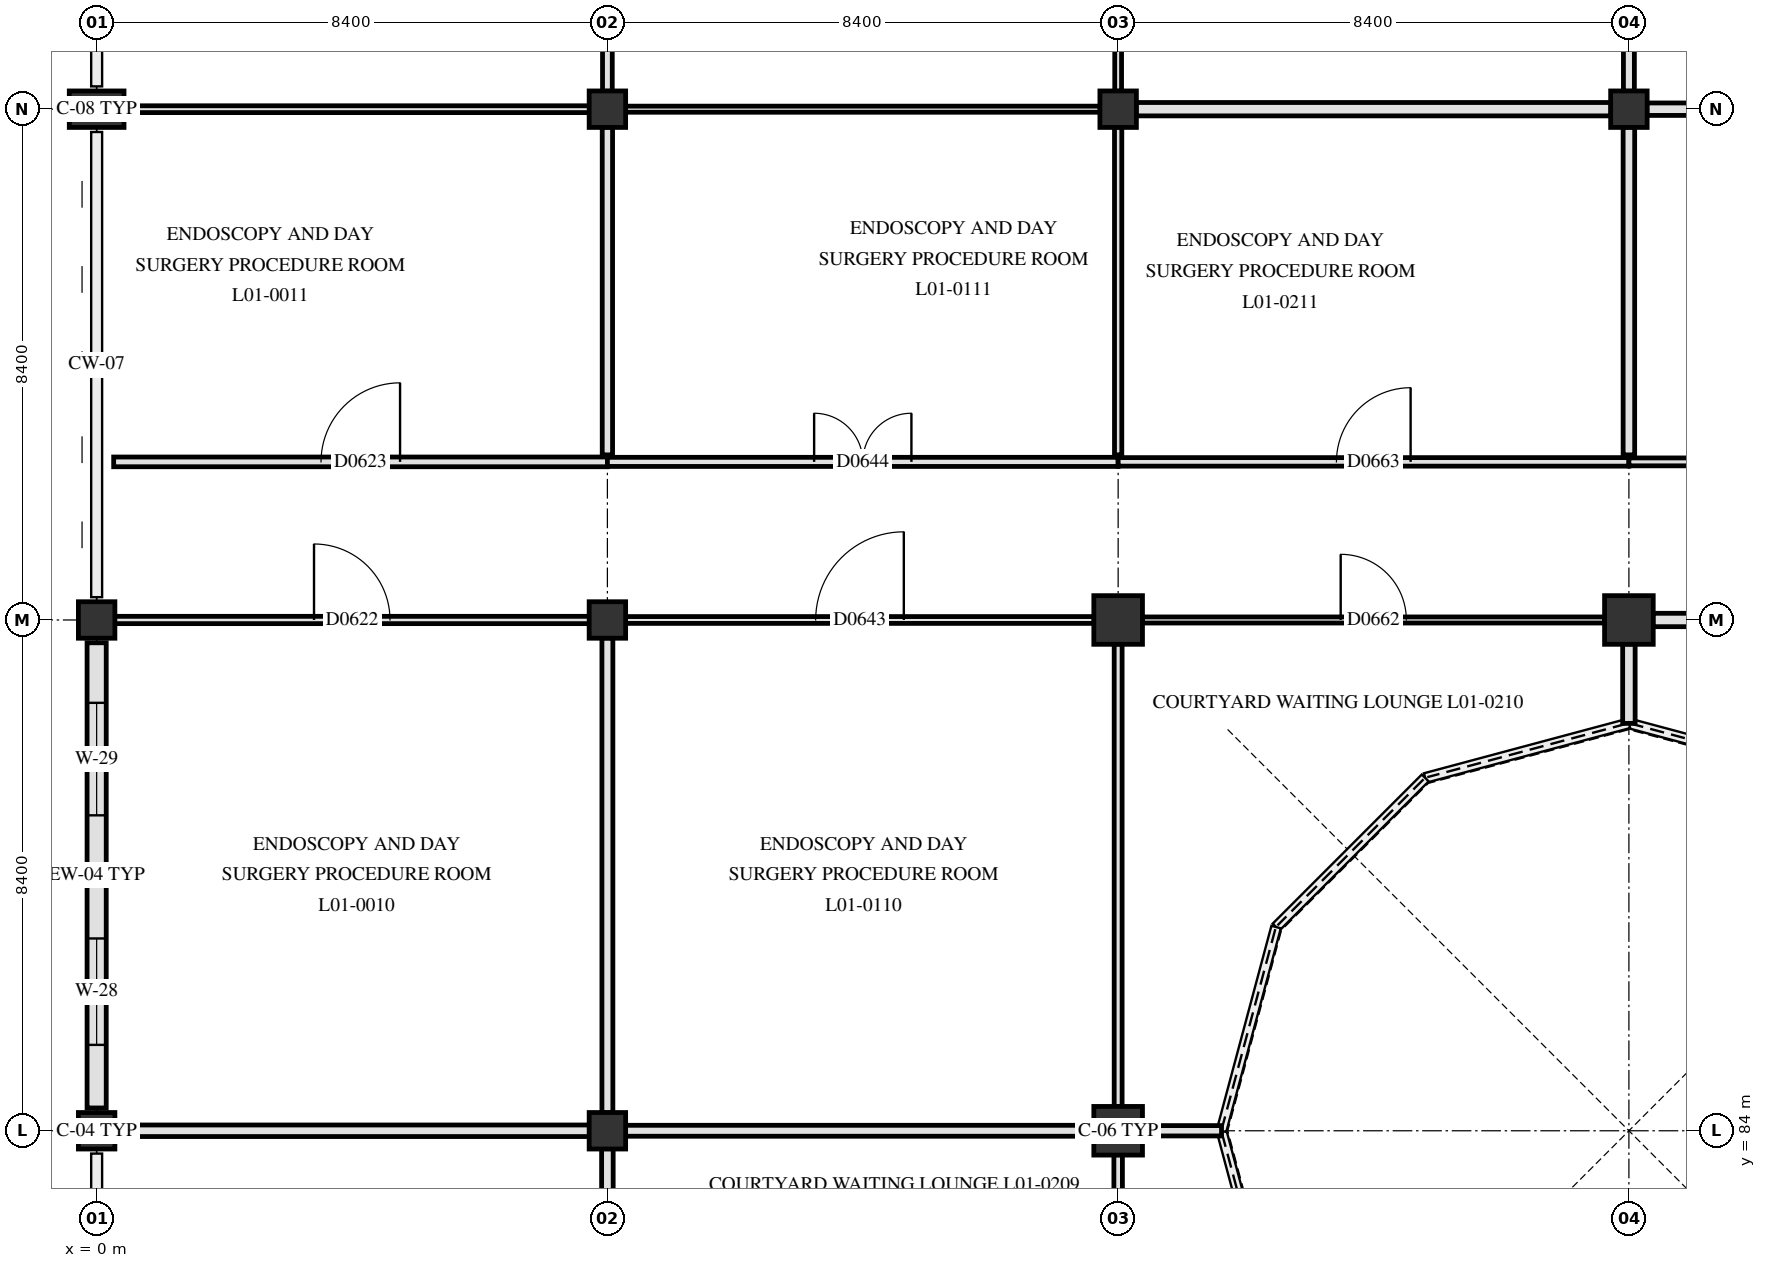
"""IFC4 building model, lengths in metres.
Left out: names, types, materials, properties, quantities, classifications, styles, units other than length and angle.
Written with IfcOpenShell. Run it as: python <this file> out.ifc"""

import sys

from ifc_helpers import new_model, si_unit, direction, frame, frame_2d, origin, origin_2d, place, context, subcontext, project, spatial, rectangle, circle, extrude, element, fill, save


model = new_model("IFC4")
c1 = context("Model", 3, precision=1e-05, world=origin(), true_north=direction((0.0, 1.0)))
c2 = subcontext(c1, "Body", "Model", "MODEL_VIEW")
j1 = project(units=[si_unit("LENGTHUNIT", "METRE"), si_unit("PLANEANGLEUNIT", "RADIAN")], contexts=[c1])
p1 = place(None, origin())
s1 = spatial("IfcSite", under=j1, at=p1, CompositionType="ELEMENT")
p2 = place(p1, origin())
s2 = spatial("IfcBuilding", under=s1, at=p2, CompositionType="ELEMENT")
p3 = place(p2, frame((0.0, 0.0, 4.8)))
s3 = spatial("IfcBuildingStorey", under=s2, at=p3, CompositionType="ELEMENT", Elevation=4.8)
for number, where, z_axis, x_axis in (
    (1, (0.0, 84.0, 0.0), (0.0, 0.0, 1.0), (1.0, 0.0, 0.0)),
    (2, (0.0, 92.4, 0.0), (0.0, 0.0, 1.0), (1.0, 0.0, 0.0)),
):
    element("IfcColumn", number, at=place(p3, frame(where, z_axis=z_axis, x_axis=x_axis)), inside=s3, PredefinedType="COLUMN", context=c2, shape_type="SweptSolid", body=[
        extrude(rectangle(XDim=0.6, YDim=0.6, at=origin_2d()), origin(), (0.0, 0.0, 1.0), 4.5),
    ])
p4 = place(p3, frame((0.0, 100.8, 0.0), z_axis=(0.0, 0.0, 1.0), x_axis=(0.0, 1.0, 0.0)))
e3 = element("IfcColumn", 3, at=p4, inside=s3, PredefinedType="PILASTER", context=c2, shape_type="SweptSolid", body=[
    extrude(rectangle(XDim=0.6, YDim=0.9, at=origin_2d()), origin(), (0.0, 0.0, 1.0), 4.5),
])
for number, where, z_axis, x_axis in (
    (4, (8.4, 84.0, 0.0), (0.0, 0.0, 1.0), (1.0, 0.0, 0.0)),
    (5, (8.4, 92.4, 0.0), (0.0, 0.0, 1.0), (1.0, 0.0, 0.0)),
    (6, (8.4, 100.8, 0.0), (0.0, 0.0, 1.0), (1.0, 0.0, 0.0)),
):
    element("IfcColumn", number, at=place(p3, frame(where, z_axis=z_axis, x_axis=x_axis)), inside=s3, PredefinedType="COLUMN", context=c2, shape_type="SweptSolid", body=[
        extrude(rectangle(XDim=0.6, YDim=0.6, at=origin_2d()), origin(), (0.0, 0.0, 1.0), 4.5),
    ])
for number, where, z_axis, x_axis in (
    (7, (16.8, 84.0, 0.0), (0.0, 0.0, 1.0), (1.0, 0.0, 0.0)),
    (8, (16.8, 92.4, 0.0), (0.0, 0.0, 1.0), (1.0, 0.0, 0.0)),
):
    element("IfcColumn", number, at=place(p3, frame(where, z_axis=z_axis, x_axis=x_axis)), inside=s3, PredefinedType="COLUMN", context=c2, shape_type="SweptSolid", body=[
        extrude(circle(Radius=0.4, at=origin_2d()), origin(), (0.0, 0.0, 1.0), 4.5),
    ])
p5 = place(p3, frame((16.8, 100.8, 0.0), z_axis=(0.0, 0.0, 1.0), x_axis=(1.0, 0.0, 0.0)))
e9 = element("IfcColumn", 9, at=p5, inside=s3, PredefinedType="COLUMN", context=c2, shape_type="SweptSolid", body=[
    extrude(rectangle(XDim=0.6, YDim=0.6, at=origin_2d()), origin(), (0.0, 0.0, 1.0), 4.5),
])
p6 = place(p3, frame((25.2, 92.4, 0.0), z_axis=(0.0, 0.0, 1.0), x_axis=(1.0, 0.0, 0.0)))
e10 = element("IfcColumn", 10, at=p6, inside=s3, PredefinedType="COLUMN", context=c2, shape_type="SweptSolid", body=[
    extrude(circle(Radius=0.4, at=origin_2d()), origin(), (0.0, 0.0, 1.0), 4.5),
])
p7 = place(p3, frame((25.2, 100.8, 0.0), z_axis=(0.0, 0.0, 1.0), x_axis=(1.0, 0.0, 0.0)))
e11 = element("IfcColumn", 11, at=p7, inside=s3, PredefinedType="COLUMN", context=c2, shape_type="SweptSolid", body=[
    extrude(rectangle(XDim=0.6, YDim=0.6, at=origin_2d()), origin(), (0.0, 0.0, 1.0), 4.5),
])
p8 = place(p3, frame((0.0, 84.375, 0.0), z_axis=(0.0, 0.0, 1.0), x_axis=(0.0, 1.0, 0.0)))
e12 = element("IfcWall", 12, at=p8, inside=s3, PredefinedType="SOLIDWALL", context=c2, shape_type="SweptSolid", body=[
    extrude(rectangle(XDim=7.65, YDim=0.315, at=frame_2d((3.825, 0.0))), origin(), (0.0, 0.0, 1.0), 3.44),
])
p9 = place(p8, frame((1.038, 0.0, 0.85)))
e13 = element("IfcOpeningElement", 13, at=p9, cuts=e12, PredefinedType="OPENING", context=c2, shape_type="SweptSolid", body=[
    extrude(rectangle(XDim=1.75, YDim=1.54, at=frame_2d((0.875, 0.77))), frame((0.0, 0.167, 0.0), z_axis=(0.0, -1.0, 0.0), x_axis=(1.0, 0.0, 0.0)), (0.0, 0.0, 1.0), 0.335),
])
p10 = place(p8, frame((4.812, 0.0, 0.85)))
e14 = element("IfcOpeningElement", 14, at=p10, cuts=e12, PredefinedType="OPENING", context=c2, shape_type="SweptSolid", body=[
    extrude(rectangle(XDim=1.85, YDim=1.54, at=frame_2d((0.925, 0.77))), frame((0.0, 0.167, 0.0), z_axis=(0.0, -1.0, 0.0), x_axis=(1.0, 0.0, 0.0)), (0.0, 0.0, 1.0), 0.335),
])
p11 = place(p3, frame((0.295, 84.0, 0.0), z_axis=(0.0, 0.0, 1.0), x_axis=(1.0, 0.0, 0.0)))
e15 = element("IfcWall", 15, at=p11, inside=s3, PredefinedType="PARTITIONING", context=c2, shape_type="SweptSolid", body=[
    extrude(rectangle(XDim=7.81, YDim=0.19, at=frame_2d((3.905, 0.0))), origin(), (0.0, 0.0, 1.0), 3.54),
])
p12 = place(p3, frame((8.695, 84.0, 0.0), z_axis=(0.0, 0.0, 1.0), x_axis=(1.0, 0.0, 0.0)))
e16 = element("IfcWall", 16, at=p12, inside=s3, PredefinedType="PARTITIONING", context=c2, shape_type="SweptSolid", body=[
    extrude(rectangle(XDim=7.71, YDim=0.18, at=frame_2d((3.855, 0.0))), origin(), (0.0, 0.0, 1.0), 3.54),
])
p13 = place(p3, frame((17.195, 84.0, 0.0), z_axis=(0.0, 0.0, 1.0), x_axis=(1.0, 0.0, 0.0)))
e17 = element("IfcWall", 17, at=p13, inside=s3, PredefinedType="PARTITIONING", context=c2, shape_type="SweptSolid", body=[
    extrude(rectangle(XDim=1.305, YDim=0.17, at=frame_2d((0.652, 0.0))), origin(), (0.0, 0.0, 1.0), 4.14),
])
p14 = place(p3, frame((0.295, 92.4, 0.0), z_axis=(0.0, 0.0, 1.0), x_axis=(1.0, 0.0, 0.0)))
e18 = element("IfcWall", 18, at=p14, inside=s3, PredefinedType="PARTITIONING", context=c2, shape_type="SweptSolid", body=[
    extrude(rectangle(XDim=7.81, YDim=0.12, at=frame_2d((3.905, 0.0))), origin(), (0.0, 0.0, 1.0), 3.54),
])
p15 = place(p14, frame((3.28, 0.0, 0.0)))
e19 = element("IfcOpeningElement", 19, at=p15, cuts=e18, PredefinedType="OPENING", context=c2, shape_type="SweptSolid", body=[
    extrude(rectangle(XDim=1.25, YDim=2.2, at=frame_2d((0.625, 1.1))), frame((0.0, 0.07, 0.0), z_axis=(0.0, -1.0, 0.0), x_axis=(1.0, 0.0, 0.0)), (0.0, 0.0, 1.0), 0.14),
])
p16 = place(p3, frame((8.695, 92.4, 0.0), z_axis=(0.0, 0.0, 1.0), x_axis=(1.0, 0.0, 0.0)))
e20 = element("IfcWall", 20, at=p16, inside=s3, PredefinedType="PARTITIONING", context=c2, shape_type="SweptSolid", body=[
    extrude(rectangle(XDim=7.71, YDim=0.112, at=frame_2d((3.855, 0.0))), origin(), (0.0, 0.0, 1.0), 3.54),
])
p17 = place(p16, frame((3.13, 0.0, 0.0)))
e21 = element("IfcOpeningElement", 21, at=p17, cuts=e20, PredefinedType="OPENING", context=c2, shape_type="SweptSolid", body=[
    extrude(rectangle(XDim=1.45, YDim=2.2, at=frame_2d((0.725, 1.1))), frame((0.0, 0.066, 0.0), z_axis=(0.0, -1.0, 0.0), x_axis=(1.0, 0.0, 0.0)), (0.0, 0.0, 1.0), 0.132),
])
p18 = place(p3, frame((17.195, 92.4, 0.0), z_axis=(0.0, 0.0, 1.0), x_axis=(1.0, 0.0, 0.0)))
e22 = element("IfcWall", 22, at=p18, inside=s3, PredefinedType="PARTITIONING", context=c2, shape_type="SweptSolid", body=[
    extrude(rectangle(XDim=7.61, YDim=0.1, at=frame_2d((3.805, 0.0))), origin(), (0.0, 0.0, 1.0), 3.54),
])
p19 = place(p18, frame((3.265, 0.0, 0.0)))
e23 = element("IfcOpeningElement", 23, at=p19, cuts=e22, PredefinedType="OPENING", context=c2, shape_type="SweptSolid", body=[
    extrude(rectangle(XDim=1.08, YDim=2.12, at=frame_2d((0.54, 1.06))), frame((0.0, 0.06, 0.0), z_axis=(0.0, -1.0, 0.0), x_axis=(1.0, 0.0, 0.0)), (0.0, 0.0, 1.0), 0.12),
])
p20 = place(p3, frame((25.595, 92.4, 0.0), z_axis=(0.0, 0.0, 1.0), x_axis=(1.0, 0.0, 0.0)))
e24 = element("IfcWall", 24, at=p20, inside=s3, PredefinedType="PARTITIONING", context=c2, shape_type="SweptSolid", body=[
    extrude(rectangle(XDim=7.61, YDim=0.22, at=frame_2d((3.805, 0.0))), origin(), (0.0, 0.0, 1.0), 3.54),
])
p21 = place(p20, frame((2.955, 0.0, 0.0)))
e25 = element("IfcOpeningElement", 25, at=p21, cuts=e24, PredefinedType="OPENING", context=c2, shape_type="SweptSolid", body=[
    extrude(rectangle(XDim=1.7, YDim=2.25, at=frame_2d((0.85, 1.125))), frame((0.0, 0.12, 0.0), z_axis=(0.0, -1.0, 0.0), x_axis=(1.0, 0.0, 0.0)), (0.0, 0.0, 1.0), 0.24),
])
p22 = place(p3, frame((0.28, 95.0, 0.0), z_axis=(0.0, 0.0, 1.0), x_axis=(1.0, 0.0, 0.0)))
e26 = element("IfcWall", 26, at=p22, inside=s3, PredefinedType="PARTITIONING", context=c2, shape_type="SweptSolid", body=[
    extrude(rectangle(XDim=8.12, YDim=0.16, at=frame_2d((4.06, 0.0))), origin(), (0.0, 0.0, 1.0), 3.59),
])
p23 = place(p22, frame((3.41, 0.0, 0.0)))
e27 = element("IfcOpeningElement", 27, at=p23, cuts=e26, PredefinedType="OPENING", context=c2, shape_type="SweptSolid", body=[
    extrude(rectangle(XDim=1.3, YDim=2.2, at=frame_2d((0.65, 1.1))), frame((0.0, 0.09, 0.0), z_axis=(0.0, -1.0, 0.0), x_axis=(1.0, 0.0, 0.0)), (0.0, 0.0, 1.0), 0.18),
])
p24 = place(p3, frame((8.4, 95.0, 0.0), z_axis=(0.0, 0.0, 1.0), x_axis=(1.0, 0.0, 0.0)))
e28 = element("IfcWall", 28, at=p24, inside=s3, PredefinedType="PARTITIONING", context=c2, shape_type="SweptSolid", body=[
    extrude(rectangle(XDim=8.4, YDim=0.15, at=frame_2d((4.2, 0.0))), origin(), (0.0, 0.0, 1.0), 3.59),
])
p25 = place(p24, frame((3.4, 0.0, 0.0)))
e29 = element("IfcOpeningElement", 29, at=p25, cuts=e28, PredefinedType="OPENING", context=c2, shape_type="SweptSolid", body=[
    extrude(rectangle(XDim=1.6, YDim=2.25, at=frame_2d((0.8, 1.125))), frame((0.0, 0.085, 0.0), z_axis=(0.0, -1.0, 0.0), x_axis=(1.0, 0.0, 0.0)), (0.0, 0.0, 1.0), 0.17),
])
p26 = place(p3, frame((16.8, 95.0, 0.0), z_axis=(0.0, 0.0, 1.0), x_axis=(1.0, 0.0, 0.0)))
e30 = element("IfcWall", 30, at=p26, inside=s3, PredefinedType="PARTITIONING", context=c2, shape_type="SweptSolid", body=[
    extrude(rectangle(XDim=8.4, YDim=0.14, at=frame_2d((4.2, 0.0))), origin(), (0.0, 0.0, 1.0), 3.59),
])
p27 = place(p26, frame((3.59, 0.0, 0.0)))
e31 = element("IfcOpeningElement", 31, at=p27, cuts=e30, PredefinedType="OPENING", context=c2, shape_type="SweptSolid", body=[
    extrude(rectangle(XDim=1.22, YDim=2.18, at=frame_2d((0.61, 1.09))), frame((0.0, 0.08, 0.0), z_axis=(0.0, -1.0, 0.0), x_axis=(1.0, 0.0, 0.0)), (0.0, 0.0, 1.0), 0.16),
])
p28 = place(p3, frame((25.2, 95.0, 0.0), z_axis=(0.0, 0.0, 1.0), x_axis=(1.0, 0.0, 0.0)))
e32 = element("IfcWall", 32, at=p28, inside=s3, PredefinedType="PARTITIONING", context=c2, shape_type="SweptSolid", body=[
    extrude(rectangle(XDim=8.4, YDim=0.13, at=frame_2d((4.2, 0.0))), origin(), (0.0, 0.0, 1.0), 3.59),
])
p29 = place(p28, frame((3.7, 0.0, 0.0)))
e33 = element("IfcOpeningElement", 33, at=p29, cuts=e32, PredefinedType="OPENING", context=c2, shape_type="SweptSolid", body=[
    extrude(rectangle(XDim=1.0, YDim=2.15, at=frame_2d((0.5, 1.075))), frame((0.0, 0.075, 0.0), z_axis=(0.0, -1.0, 0.0), x_axis=(1.0, 0.0, 0.0)), (0.0, 0.0, 1.0), 0.15),
])
p30 = place(p3, frame((0.295, 100.8, 0.0), z_axis=(0.0, 0.0, 1.0), x_axis=(1.0, 0.0, 0.0)))
e34 = element("IfcWall", 34, at=p30, inside=s3, PredefinedType="PARTITIONING", context=c2, shape_type="SweptSolid", body=[
    extrude(rectangle(XDim=7.81, YDim=0.112, at=frame_2d((3.905, 0.0))), origin(), (0.0, 0.0, 1.0), 3.54),
])
p31 = place(p3, frame((8.695, 100.8, 0.0), z_axis=(0.0, 0.0, 1.0), x_axis=(1.0, 0.0, 0.0)))
e35 = element("IfcWall", 35, at=p31, inside=s3, PredefinedType="PARTITIONING", context=c2, shape_type="SweptSolid", body=[
    extrude(rectangle(XDim=7.81, YDim=0.1, at=frame_2d((3.905, 0.0))), origin(), (0.0, 0.0, 1.0), 3.54),
])
p32 = place(p3, frame((17.095, 100.8, 0.0), z_axis=(0.0, 0.0, 1.0), x_axis=(1.0, 0.0, 0.0)))
e36 = element("IfcWall", 36, at=p32, inside=s3, PredefinedType="PARTITIONING", context=c2, shape_type="SweptSolid", body=[
    extrude(rectangle(XDim=7.81, YDim=0.22, at=frame_2d((3.905, 0.0))), origin(), (0.0, 0.0, 1.0), 3.54),
])
p33 = place(p3, frame((25.495, 100.8, 0.0), z_axis=(0.0, 0.0, 1.0), x_axis=(1.0, 0.0, 0.0)))
e37 = element("IfcWall", 37, at=p33, inside=s3, PredefinedType="PARTITIONING", context=c2, shape_type="SweptSolid", body=[
    extrude(rectangle(XDim=7.81, YDim=0.205, at=frame_2d((3.905, 0.0))), origin(), (0.0, 0.0, 1.0), 3.54),
])
p34 = place(p3, frame((8.4, 78.315, 0.0), z_axis=(0.0, 0.0, 1.0), x_axis=(0.0, 1.0, 0.0)))
e38 = element("IfcWall", 38, at=p34, inside=s3, PredefinedType="PARTITIONING", context=c2, shape_type="SweptSolid", body=[
    extrude(rectangle(XDim=5.39, YDim=0.19, at=frame_2d((2.695, 0.0))), origin(), (0.0, 0.0, 1.0), 3.59),
])
p35 = place(p3, frame((8.4, 84.295, 0.0), z_axis=(0.0, 0.0, 1.0), x_axis=(0.0, 1.0, 0.0)))
e39 = element("IfcWall", 39, at=p35, inside=s3, PredefinedType="PARTITIONING", context=c2, shape_type="SweptSolid", body=[
    extrude(rectangle(XDim=7.81, YDim=0.18, at=frame_2d((3.905, 0.0))), origin(), (0.0, 0.0, 1.0), 3.59),
])
p36 = place(p3, frame((8.4, 95.115, 0.0), z_axis=(0.0, 0.0, 1.0), x_axis=(0.0, 1.0, 0.0)))
e40 = element("IfcWall", 40, at=p36, inside=s3, PredefinedType="PARTITIONING", context=c2, shape_type="SweptSolid", body=[
    extrude(rectangle(XDim=5.39, YDim=0.17, at=frame_2d((2.695, 0.0))), origin(), (0.0, 0.0, 1.0), 3.59),
])
p37 = place(p3, frame((8.4, 101.095, 0.0), z_axis=(0.0, 0.0, 1.0), x_axis=(0.0, 1.0, 0.0)))
e41 = element("IfcWall", 41, at=p37, inside=s3, PredefinedType="PARTITIONING", context=c2, shape_type="SweptSolid", body=[
    extrude(rectangle(XDim=5.39, YDim=0.16, at=frame_2d((2.695, 0.0))), origin(), (0.0, 0.0, 1.0), 3.59),
])
p38 = place(p3, frame((16.8, 78.315, 0.0), z_axis=(0.0, 0.0, 1.0), x_axis=(0.0, 1.0, 0.0)))
e42 = element("IfcWall", 42, at=p38, inside=s3, PredefinedType="PARTITIONING", context=c2, shape_type="SweptSolid", body=[
    extrude(rectangle(XDim=5.29, YDim=0.14, at=frame_2d((2.645, 0.0))), origin(), (0.0, 0.0, 1.0), 3.59),
])
p39 = place(p3, frame((16.8, 84.395, 0.0), z_axis=(0.0, 0.0, 1.0), x_axis=(0.0, 1.0, 0.0)))
e43 = element("IfcWall", 43, at=p39, inside=s3, PredefinedType="PARTITIONING", context=c2, shape_type="SweptSolid", body=[
    extrude(rectangle(XDim=7.61, YDim=0.13, at=frame_2d((3.805, 0.0))), origin(), (0.0, 0.0, 1.0), 3.59),
])
p40 = place(p3, frame((16.8, 95.115, 0.0), z_axis=(0.0, 0.0, 1.0), x_axis=(0.0, 1.0, 0.0)))
e44 = element("IfcWall", 44, at=p40, inside=s3, PredefinedType="PARTITIONING", context=c2, shape_type="SweptSolid", body=[
    extrude(rectangle(XDim=5.39, YDim=0.12, at=frame_2d((2.695, 0.0))), origin(), (0.0, 0.0, 1.0), 3.59),
])
p41 = place(p3, frame((16.8, 101.095, 0.0), z_axis=(0.0, 0.0, 1.0), x_axis=(0.0, 1.0, 0.0)))
e45 = element("IfcWall", 45, at=p41, inside=s3, PredefinedType="PARTITIONING", context=c2, shape_type="SweptSolid", body=[
    extrude(rectangle(XDim=5.39, YDim=0.112, at=frame_2d((2.695, 0.0))), origin(), (0.0, 0.0, 1.0), 3.59),
])
p42 = place(p3, frame((25.2, 90.7, 0.0), z_axis=(0.0, 0.0, 1.0), x_axis=(0.0, 1.0, 0.0)))
e46 = element("IfcWall", 46, at=p42, inside=s3, PredefinedType="PARTITIONING", context=c2, shape_type="SweptSolid", body=[
    extrude(rectangle(XDim=1.305, YDim=0.205, at=frame_2d((0.652, 0.0))), origin(), (0.0, 0.0, 1.0), 4.14),
])
p43 = place(p3, frame((25.2, 95.115, 0.0), z_axis=(0.0, 0.0, 1.0), x_axis=(0.0, 1.0, 0.0)))
e47 = element("IfcWall", 47, at=p43, inside=s3, PredefinedType="PARTITIONING", context=c2, shape_type="SweptSolid", body=[
    extrude(rectangle(XDim=5.39, YDim=0.19, at=frame_2d((2.695, 0.0))), origin(), (0.0, 0.0, 1.0), 3.59),
])
p44 = place(p3, frame((25.2, 101.095, 0.0), z_axis=(0.0, 0.0, 1.0), x_axis=(0.0, 1.0, 0.0)))
e48 = element("IfcWall", 48, at=p44, inside=s3, PredefinedType="PARTITIONING", context=c2, shape_type="SweptSolid", body=[
    extrude(rectangle(XDim=5.39, YDim=0.18, at=frame_2d((2.695, 0.0))), origin(), (0.0, 0.0, 1.0), 3.59),
])
p45 = place(p9, origin())
e49 = element("IfcWindow", 49, at=p45, inside=s3, PartitioningType="SINGLE_PANEL", PredefinedType="WINDOW", context=c2, shape_type="SweptSolid", body=[
    extrude(rectangle(XDim=1.75, YDim=1.54, at=frame_2d((0.875, 0.77))), frame((0.0, 0.03, 0.0), z_axis=(0.0, -1.0, 0.0), x_axis=(1.0, 0.0, 0.0)), (0.0, 0.0, 1.0), 0.06),
])
fill(e13, e49)
p46 = place(p10, origin())
e50 = element("IfcWindow", 50, at=p46, inside=s3, PartitioningType="SINGLE_PANEL", PredefinedType="WINDOW", context=c2, shape_type="SweptSolid", body=[
    extrude(rectangle(XDim=1.85, YDim=1.54, at=frame_2d((0.925, 0.77))), frame((0.0, 0.03, 0.0), z_axis=(0.0, -1.0, 0.0), x_axis=(1.0, 0.0, 0.0)), (0.0, 0.0, 1.0), 0.06),
])
fill(e14, e50)
p47 = place(p15, origin())
e51 = element("IfcDoor", 51, at=p47, inside=s3, OperationType="SINGLE_SWING_LEFT", PredefinedType="DOOR", context=c2, shape_type="SweptSolid", body=[
    extrude(rectangle(XDim=1.25, YDim=2.2, at=frame_2d((0.625, 1.1))), frame((0.0, 0.025, 0.0), z_axis=(0.0, -1.0, 0.0), x_axis=(1.0, 0.0, 0.0)), (0.0, 0.0, 1.0), 0.05),
])
fill(e19, e51)
p48 = place(p23, origin())
e52 = element("IfcDoor", 52, at=p48, inside=s3, OperationType="SINGLE_SWING_RIGHT", PredefinedType="DOOR", context=c2, shape_type="SweptSolid", body=[
    extrude(rectangle(XDim=1.3, YDim=2.2, at=frame_2d((0.65, 1.1))), frame((0.0, 0.025, 0.0), z_axis=(0.0, -1.0, 0.0), x_axis=(1.0, 0.0, 0.0)), (0.0, 0.0, 1.0), 0.05),
])
fill(e27, e52)
p49 = place(p17, origin())
e53 = element("IfcDoor", 53, at=p49, inside=s3, OperationType="SINGLE_SWING_RIGHT", PredefinedType="DOOR", context=c2, shape_type="SweptSolid", body=[
    extrude(rectangle(XDim=1.45, YDim=2.2, at=frame_2d((0.725, 1.1))), frame((0.0, 0.025, 0.0), z_axis=(0.0, -1.0, 0.0), x_axis=(1.0, 0.0, 0.0)), (0.0, 0.0, 1.0), 0.05),
])
fill(e21, e53)
p50 = place(p25, origin())
e54 = element("IfcDoor", 54, at=p50, inside=s3, OperationType="DOUBLE_SWING_LEFT", PredefinedType="DOOR", context=c2, shape_type="SweptSolid", body=[
    extrude(rectangle(XDim=1.6, YDim=2.25, at=frame_2d((0.8, 1.125))), frame((0.0, 0.025, 0.0), z_axis=(0.0, -1.0, 0.0), x_axis=(1.0, 0.0, 0.0)), (0.0, 0.0, 1.0), 0.05),
])
fill(e29, e54)
p51 = place(p19, origin())
e55 = element("IfcDoor", 55, at=p51, inside=s3, OperationType="SINGLE_SWING_LEFT", PredefinedType="DOOR", context=c2, shape_type="SweptSolid", body=[
    extrude(rectangle(XDim=1.08, YDim=2.12, at=frame_2d((0.54, 1.06))), frame((0.0, 0.025, 0.0), z_axis=(0.0, -1.0, 0.0), x_axis=(1.0, 0.0, 0.0)), (0.0, 0.0, 1.0), 0.05),
])
fill(e23, e55)
p52 = place(p27, origin())
e56 = element("IfcDoor", 56, at=p52, inside=s3, OperationType="SINGLE_SWING_RIGHT", PredefinedType="DOOR", context=c2, shape_type="SweptSolid", body=[
    extrude(rectangle(XDim=1.22, YDim=2.18, at=frame_2d((0.61, 1.09))), frame((0.0, 0.025, 0.0), z_axis=(0.0, -1.0, 0.0), x_axis=(1.0, 0.0, 0.0)), (0.0, 0.0, 1.0), 0.05),
])
fill(e31, e56)
save(model, sys.argv[1])
